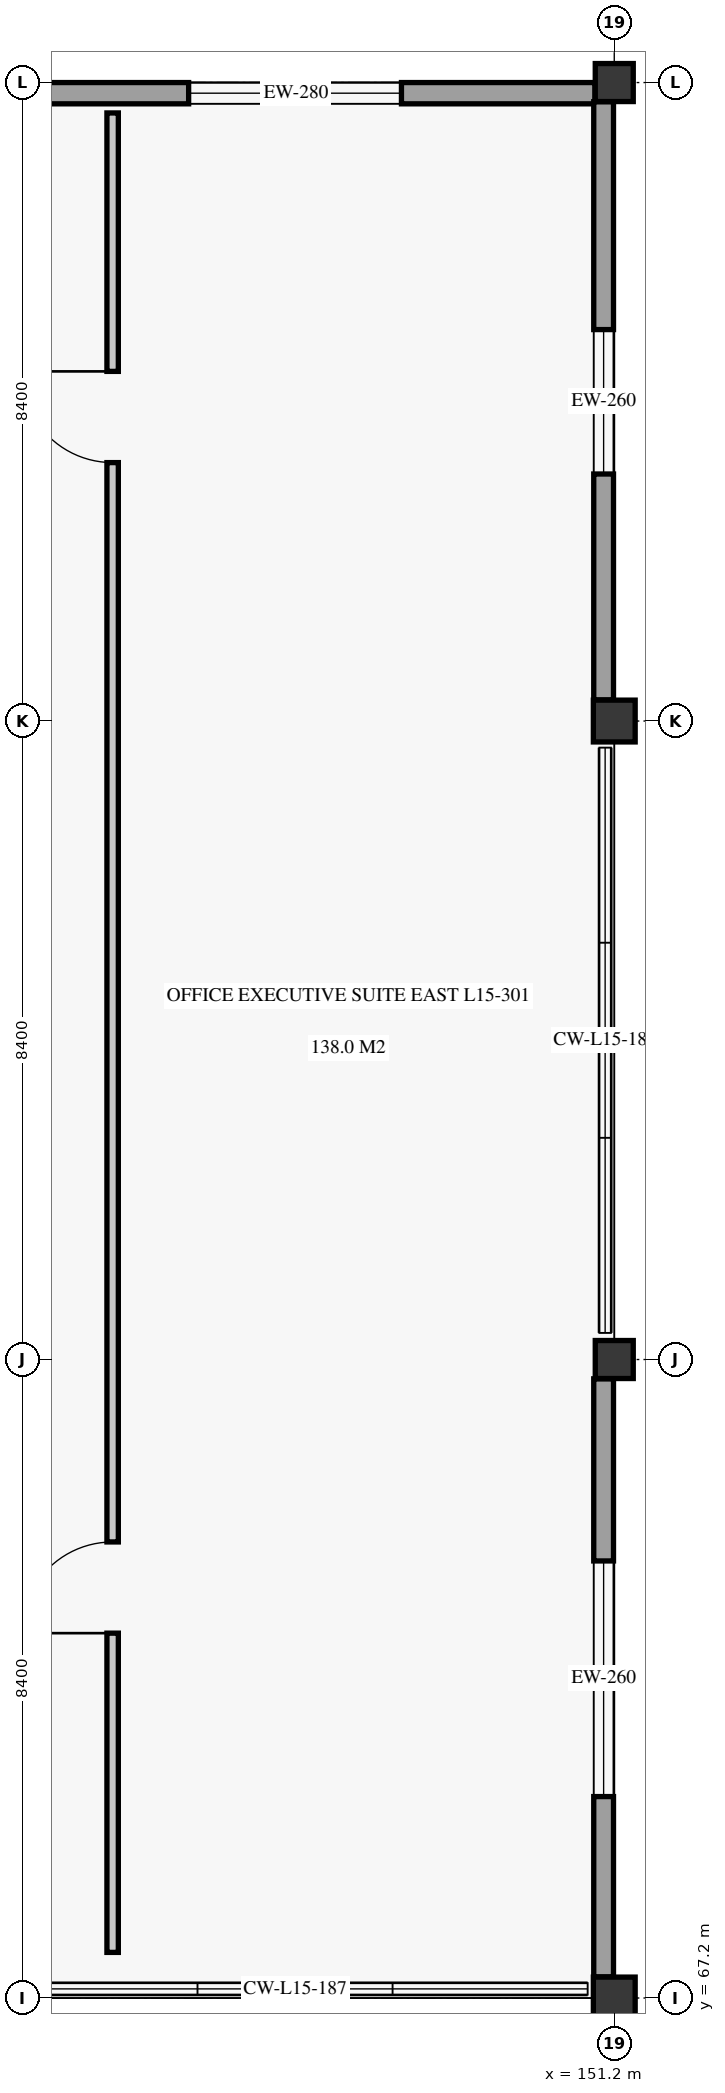
"""IFC4 building model, lengths in metres.
Left out: names, types, materials, properties, quantities, classifications, styles, units other than length and angle.
Written with IfcOpenShell. Run it as: python <this file> out.ifc"""

import sys

from ifc_helpers import new_model, si_unit, direction, frame, frame_2d, origin, origin_2d, place, context, subcontext, project, spatial, rectangle, extrude, element, fill, save


model = new_model("IFC4")
c1 = context("Model", 3, precision=1e-05, world=origin(), true_north=direction((0.0, 1.0)))
c2 = subcontext(c1, "Body", "Model", "MODEL_VIEW")
j1 = project(units=[si_unit("LENGTHUNIT", "METRE"), si_unit("PLANEANGLEUNIT", "RADIAN")], contexts=[c1])
p1 = place(None, origin())
s1 = spatial("IfcSite", under=j1, at=p1, CompositionType="ELEMENT")
p2 = place(p1, origin())
s2 = spatial("IfcBuilding", under=s1, at=p2, CompositionType="ELEMENT")
p3 = place(p2, frame((0.0, 0.0, 62.7)))
s3 = spatial("IfcBuildingStorey", under=s2, at=p3, CompositionType="ELEMENT", Elevation=62.7)
p4 = place(p3, frame((151.2, 67.2, 0.0), z_axis=(0.0, 0.0, 1.0), x_axis=(1.0, 0.0, 0.0)))
e1 = element("IfcColumn", 1, at=p4, inside=s3, PredefinedType="COLUMN", context=c2, shape_type="SweptSolid", body=[
    extrude(rectangle(XDim=0.55, YDim=0.55, at=origin_2d()), origin(), (0.0, 0.0, 1.0), 3.72),
])
p5 = place(p3, frame((151.2, 75.6, 0.0), z_axis=(0.0, 0.0, 1.0), x_axis=(1.0, 0.0, 0.0)))
e2 = element("IfcColumn", 2, at=p5, inside=s3, PredefinedType="COLUMN", context=c2, shape_type="SweptSolid", body=[
    extrude(rectangle(XDim=0.5, YDim=0.5, at=origin_2d()), origin(), (0.0, 0.0, 1.0), 3.72),
])
p6 = place(p3, frame((151.2, 84.0, 0.0), z_axis=(0.0, 0.0, 1.0), x_axis=(1.0, 0.0, 0.0)))
e3 = element("IfcColumn", 3, at=p6, inside=s3, PredefinedType="COLUMN", context=c2, shape_type="SweptSolid", body=[
    extrude(rectangle(XDim=0.55, YDim=0.55, at=origin_2d()), origin(), (0.0, 0.0, 1.0), 3.72),
])
p7 = place(p3, frame((151.2, 92.4, 0.0), z_axis=(0.0, 0.0, 1.0), x_axis=(1.0, 0.0, 0.0)))
e4 = element("IfcColumn", 4, at=p7, inside=s3, PredefinedType="COLUMN", context=c2, shape_type="SweptSolid", body=[
    extrude(rectangle(XDim=0.5, YDim=0.5, at=origin_2d()), origin(), (0.0, 0.0, 1.0), 3.72),
])
p8 = place(p3, frame((143.078, 92.26, 0.0), z_axis=(0.0, 0.0, 1.0), x_axis=(1.0, 0.0, 0.0)))
e5 = element("IfcWall", 5, at=p8, inside=s3, PredefinedType="SOLIDWALL", context=c2, shape_type="SweptSolid", body=[
    extrude(rectangle(XDim=7.868, YDim=0.28, at=frame_2d((3.934, 0.0))), origin(), (0.0, 0.0, 1.0), 3.04),
])
p9 = place(p8, frame((2.522, 0.0, 0.85)))
e6 = element("IfcOpeningElement", 6, at=p9, cuts=e5, PredefinedType="OPENING", context=c2, shape_type="SweptSolid", body=[
    extrude(rectangle(XDim=2.8, YDim=1.85, at=frame_2d((1.4, 0.925))), frame((0.0, 0.15, 0.0), z_axis=(0.0, -1.0, 0.0), x_axis=(1.0, 0.0, 0.0)), (0.0, 0.0, 1.0), 0.3),
])
p10 = place(p3, frame((151.06, 67.478, 0.0), z_axis=(0.0, 0.0, 1.0), x_axis=(0.0, 1.0, 0.0)))
e7 = element("IfcWall", 7, at=p10, inside=s3, PredefinedType="SOLIDWALL", context=c2, shape_type="SweptSolid", body=[
    extrude(rectangle(XDim=7.868, YDim=0.26, at=frame_2d((3.934, 0.0))), origin(), (0.0, 0.0, 1.0), 3.04),
])
p11 = place(p10, frame((2.372, 0.0, 0.85)))
e8 = element("IfcOpeningElement", 8, at=p11, cuts=e7, PredefinedType="OPENING", context=c2, shape_type="SweptSolid", body=[
    extrude(rectangle(XDim=3.1, YDim=1.85, at=frame_2d((1.55, 0.925))), frame((0.0, 0.14, 0.0), z_axis=(0.0, -1.0, 0.0), x_axis=(1.0, 0.0, 0.0)), (0.0, 0.0, 1.0), 0.28),
])
p12 = place(p3, frame((151.06, 84.278, 0.0), z_axis=(0.0, 0.0, 1.0), x_axis=(0.0, 1.0, 0.0)))
e9 = element("IfcWall", 9, at=p12, inside=s3, PredefinedType="SOLIDWALL", context=c2, shape_type="SweptSolid", body=[
    extrude(rectangle(XDim=7.87, YDim=0.26, at=frame_2d((3.935, 0.0))), origin(), (0.0, 0.0, 1.0), 3.04),
])
p13 = place(p12, frame((2.972, 0.0, 0.85)))
e10 = element("IfcOpeningElement", 10, at=p13, cuts=e9, PredefinedType="OPENING", context=c2, shape_type="SweptSolid", body=[
    extrude(rectangle(XDim=1.9, YDim=1.75, at=frame_2d((0.95, 0.875))), frame((0.0, 0.14, 0.0), z_axis=(0.0, -1.0, 0.0), x_axis=(1.0, 0.0, 0.0)), (0.0, 0.0, 1.0), 0.28),
])
p14 = place(p3, frame((144.6, 67.8, 0.0), z_axis=(0.0, 0.0, 1.0), x_axis=(0.0, 1.0, 0.0)))
e11 = element("IfcWall", 11, at=p14, inside=s3, PredefinedType="PARTITIONING", context=c2, shape_type="SweptSolid", body=[
    extrude(rectangle(XDim=24.2, YDim=0.15, at=frame_2d((12.1, 0.0))), origin(), (0.0, 0.0, 1.0), 3.34),
])
p15 = place(p14, frame((4.2, 0.0, 0.0)))
e12 = element("IfcOpeningElement", 12, at=p15, cuts=e11, PredefinedType="OPENING", context=c2, shape_type="SweptSolid", body=[
    extrude(rectangle(XDim=1.2, YDim=2.3, at=frame_2d((0.6, 1.15))), frame((0.0, 0.085, 0.0), z_axis=(0.0, -1.0, 0.0), x_axis=(1.0, 0.0, 0.0)), (0.0, 0.0, 1.0), 0.17),
])
p16 = place(p14, frame((19.6, 0.0, 0.0)))
e13 = element("IfcOpeningElement", 13, at=p16, cuts=e11, PredefinedType="OPENING", context=c2, shape_type="SweptSolid", body=[
    extrude(rectangle(XDim=1.2, YDim=2.3, at=frame_2d((0.6, 1.15))), frame((0.0, 0.085, 0.0), z_axis=(0.0, -1.0, 0.0), x_axis=(1.0, 0.0, 0.0)), (0.0, 0.0, 1.0), 0.17),
])
p17 = place(p9, origin())
e14 = element("IfcWindow", 14, at=p17, inside=s3, PartitioningType="SINGLE_PANEL", PredefinedType="WINDOW", context=c2, shape_type="SweptSolid", body=[
    extrude(rectangle(XDim=2.8, YDim=1.85, at=frame_2d((1.4, 0.925))), frame((0.0, 0.03, 0.0), z_axis=(0.0, -1.0, 0.0), x_axis=(1.0, 0.0, 0.0)), (0.0, 0.0, 1.0), 0.06),
])
fill(e6, e14)
p18 = place(p11, origin())
e15 = element("IfcWindow", 15, at=p18, inside=s3, PartitioningType="SINGLE_PANEL", PredefinedType="WINDOW", context=c2, shape_type="SweptSolid", body=[
    extrude(rectangle(XDim=3.1, YDim=1.85, at=frame_2d((1.55, 0.925))), frame((0.0, 0.03, 0.0), z_axis=(0.0, -1.0, 0.0), x_axis=(1.0, 0.0, 0.0)), (0.0, 0.0, 1.0), 0.06),
])
fill(e8, e15)
p19 = place(p13, origin())
e16 = element("IfcWindow", 16, at=p19, inside=s3, PartitioningType="SINGLE_PANEL", PredefinedType="WINDOW", context=c2, shape_type="SweptSolid", body=[
    extrude(rectangle(XDim=1.9, YDim=1.75, at=frame_2d((0.95, 0.875))), frame((0.0, 0.03, 0.0), z_axis=(0.0, -1.0, 0.0), x_axis=(1.0, 0.0, 0.0)), (0.0, 0.0, 1.0), 0.06),
])
fill(e10, e16)
p20 = place(p15, origin())
e17 = element("IfcDoor", 17, at=p20, inside=s3, OperationType="SINGLE_SWING_LEFT", PredefinedType="DOOR", context=c2, shape_type="SweptSolid", body=[
    extrude(rectangle(XDim=1.2, YDim=2.3, at=frame_2d((0.6, 1.15))), frame((0.0, 0.025, 0.0), z_axis=(0.0, -1.0, 0.0), x_axis=(1.0, 0.0, 0.0)), (0.0, 0.0, 1.0), 0.05),
])
fill(e12, e17)
p21 = place(p16, origin())
e18 = element("IfcDoor", 18, at=p21, inside=s3, OperationType="SINGLE_SWING_RIGHT", PredefinedType="DOOR", context=c2, shape_type="SweptSolid", body=[
    extrude(rectangle(XDim=1.2, YDim=2.3, at=frame_2d((0.6, 1.15))), frame((0.0, 0.025, 0.0), z_axis=(0.0, -1.0, 0.0), x_axis=(1.0, 0.0, 0.0)), (0.0, 0.0, 1.0), 0.05),
])
fill(e13, e18)
save(model, sys.argv[1])
